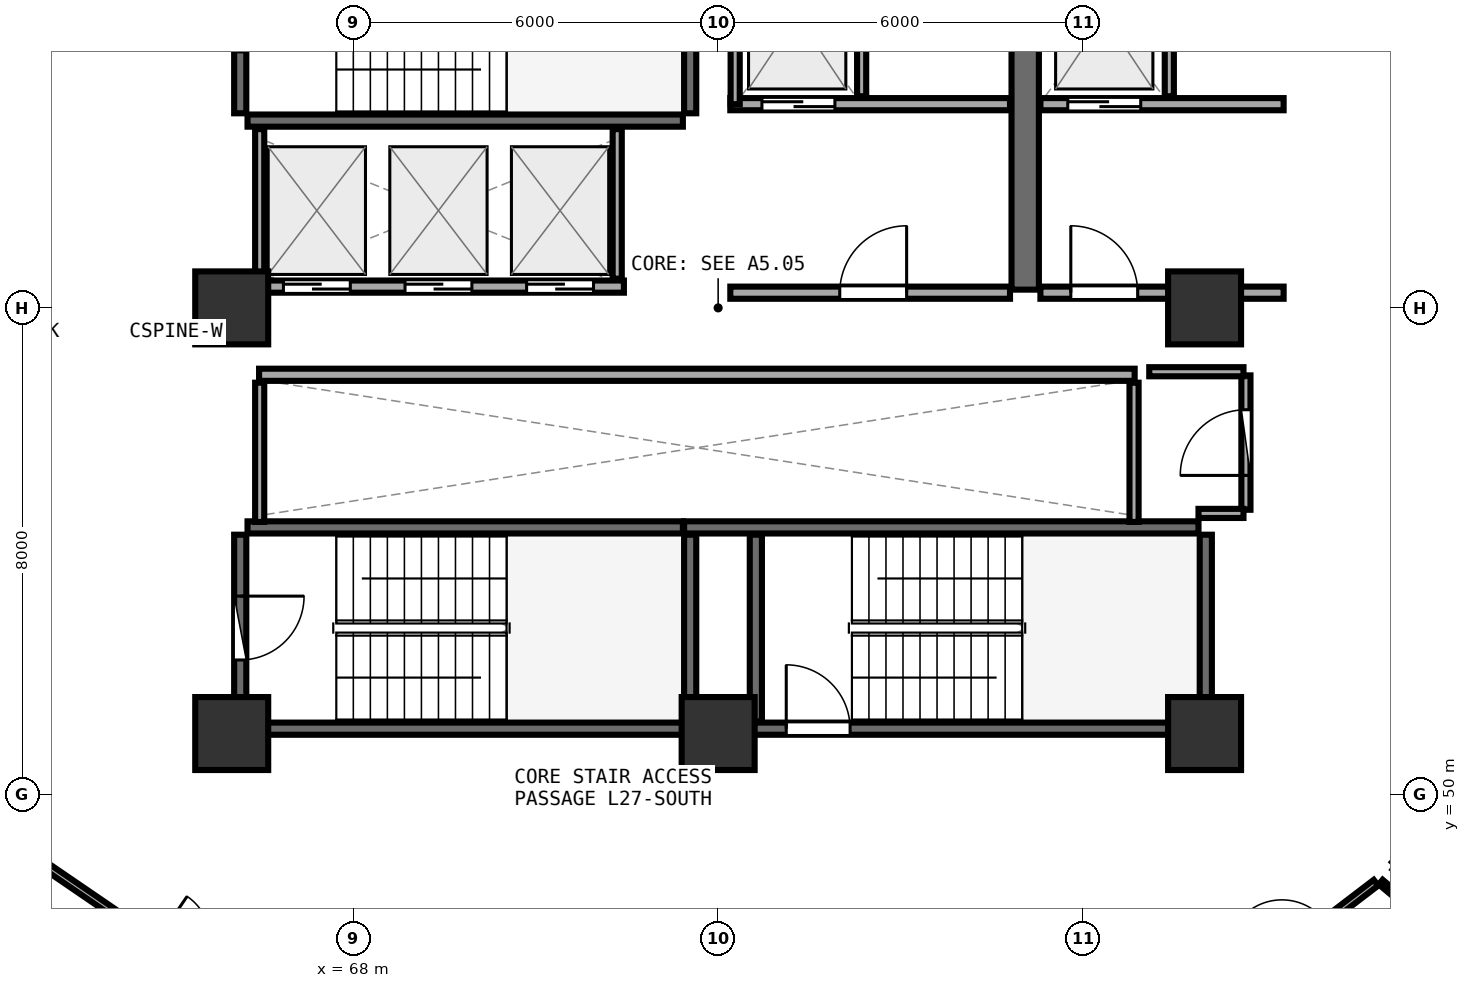
"""IFC4 building model, lengths in metres.
Left out: names, types, materials, properties, quantities, classifications, styles, units other than length and angle.
Written with IfcOpenShell. Run it as: python <this file> out.ifc"""

import sys

from ifc_helpers import new_model, si_unit, direction, frame, frame_2d, origin, origin_2d, place, context, subcontext, project, spatial, rectangle, extrude, element, fill, save


model = new_model("IFC4")
c1 = context("Model", 3, precision=1e-05, world=origin(), true_north=direction((0.0, 1.0)))
c2 = subcontext(c1, "Body", "Model", "MODEL_VIEW")
j1 = project(units=[si_unit("LENGTHUNIT", "METRE"), si_unit("PLANEANGLEUNIT", "RADIAN")], contexts=[c1])
p1 = place(None, origin())
s1 = spatial("IfcSite", under=j1, at=p1, CompositionType="ELEMENT")
p2 = place(p1, origin())
s2 = spatial("IfcBuilding", under=s1, at=p2, CompositionType="ELEMENT")
p3 = place(p2, frame((0.0, 0.0, 106.35)))
s3 = spatial("IfcBuildingStorey", under=s2, at=p3, CompositionType="ELEMENT", Elevation=106.35)
for number, where, z_axis, x_axis in (
    (1, (66.0, 51.0, 0.0), (0.0, 0.0, 1.0), (1.0, 0.0, 0.0)),
    (2, (74.0, 51.0, 0.0), (0.0, 0.0, 1.0), (1.0, 0.0, 0.0)),
    (3, (82.0, 51.0, 0.0), (0.0, 0.0, 1.0), (1.0, 0.0, 0.0)),
    (4, (82.0, 58.0, 0.0), (0.0, 0.0, 1.0), (1.0, 0.0, 0.0)),
    (5, (66.0, 58.0, 0.0), (0.0, 0.0, 1.0), (1.0, 0.0, 0.0)),
):
    element("IfcColumn", number, at=place(p3, frame(where, z_axis=z_axis, x_axis=x_axis)), inside=s3, PredefinedType="PILASTER", context=c2, shape_type="SweptSolid", body=[
        extrude(rectangle(XDim=1.2, YDim=1.2, at=origin_2d()), origin(), (0.0, 0.0, 1.0), 3.75),
    ])
p4 = place(p3, frame((66.26, 61.08, 0.0), z_axis=(0.0, 0.0, 1.0), x_axis=(1.0, 0.0, 0.0)))
e6 = element("IfcWall", 6, at=p4, inside=s3, PredefinedType="SHEAR", context=c2, shape_type="SweptSolid", body=[
    extrude(rectangle(XDim=7.16, YDim=0.2, at=frame_2d((3.58, 0.0))), origin(), (0.0, 0.0, 1.0), 3.49),
])
p5 = place(p3, frame((73.54, 61.2, 0.0), z_axis=(0.0, 0.0, 1.0), x_axis=(0.0, 1.0, 0.0)))
e7 = element("IfcWall", 7, at=p5, inside=s3, PredefinedType="SHEAR", context=c2, shape_type="SweptSolid", body=[
    extrude(rectangle(XDim=3.07, YDim=0.2, at=frame_2d((1.535, 0.0))), origin(), (0.0, 0.0, 1.0), 3.49),
])
p6 = place(p3, frame((66.14, 64.27, 0.0), z_axis=(0.0, 0.0, 1.0), x_axis=(0.0, -1.0, 0.0)))
e8 = element("IfcWall", 8, at=p6, inside=s3, PredefinedType="SHEAR", context=c2, shape_type="SweptSolid", body=[
    extrude(rectangle(XDim=3.07, YDim=0.2, at=frame_2d((1.535, 0.0))), origin(), (0.0, 0.0, 1.0), 3.49),
])
p7 = place(p6, frame((1.01, 0.0, 0.0)))
e9 = element("IfcOpeningElement", 9, at=p7, cuts=e8, PredefinedType="OPENING", context=c2, shape_type="SweptSolid", body=[
    extrude(rectangle(XDim=1.05, YDim=2.1, at=frame_2d((0.525, 1.05))), frame((0.0, 0.11, 0.0), z_axis=(0.0, -1.0, 0.0), x_axis=(1.0, 0.0, 0.0)), (0.0, 0.0, 1.0), 0.22),
])
p8 = place(p3, frame((74.0, 51.08, 0.0), z_axis=(0.0, 0.0, 1.0), x_axis=(1.0, 0.0, 0.0)))
e10 = element("IfcWall", 10, at=p8, inside=s3, PredefinedType="SHEAR", context=c2, shape_type="SweptSolid", body=[
    extrude(rectangle(XDim=7.9, YDim=0.2, at=frame_2d((3.95, 0.0))), origin(), (0.0, 0.0, 1.0), 3.49),
])
p9 = place(p8, frame((1.12, 0.0, 0.0)))
e11 = element("IfcOpeningElement", 11, at=p9, cuts=e10, PredefinedType="OPENING", context=c2, shape_type="SweptSolid", body=[
    extrude(rectangle(XDim=1.05, YDim=2.1, at=frame_2d((0.525, 1.05))), frame((0.0, 0.11, 0.0), z_axis=(0.0, -1.0, 0.0), x_axis=(1.0, 0.0, 0.0)), (0.0, 0.0, 1.0), 0.22),
])
p10 = place(p3, frame((82.02, 51.2, 0.0), z_axis=(0.0, 0.0, 1.0), x_axis=(0.0, 1.0, 0.0)))
e12 = element("IfcWall", 12, at=p10, inside=s3, PredefinedType="SHEAR", context=c2, shape_type="SweptSolid", body=[
    extrude(rectangle(XDim=3.07, YDim=0.2, at=frame_2d((1.535, 0.0))), origin(), (0.0, 0.0, 1.0), 3.49),
])
p11 = place(p3, frame((81.9, 54.39, 0.0), z_axis=(0.0, 0.0, 1.0), x_axis=(-1.0, 0.0, 0.0)))
e13 = element("IfcWall", 13, at=p11, inside=s3, PredefinedType="SHEAR", context=c2, shape_type="SweptSolid", body=[
    extrude(rectangle(XDim=8.46, YDim=0.2, at=frame_2d((4.23, 0.0))), origin(), (0.0, 0.0, 1.0), 3.49),
])
p12 = place(p3, frame((74.62, 54.27, 0.0), z_axis=(0.0, 0.0, 1.0), x_axis=(0.0, -1.0, 0.0)))
e14 = element("IfcWall", 14, at=p12, inside=s3, PredefinedType="SHEAR", context=c2, shape_type="SweptSolid", body=[
    extrude(rectangle(XDim=3.07, YDim=0.2, at=frame_2d((1.535, 0.0))), origin(), (0.0, 0.0, 1.0), 3.49),
])
p13 = place(p3, frame((66.26, 51.08, 0.0), z_axis=(0.0, 0.0, 1.0), x_axis=(1.0, 0.0, 0.0)))
e15 = element("IfcWall", 15, at=p13, inside=s3, PredefinedType="SHEAR", context=c2, shape_type="SweptSolid", body=[
    extrude(rectangle(XDim=7.16, YDim=0.2, at=frame_2d((3.58, 0.0))), origin(), (0.0, 0.0, 1.0), 3.49),
])
p14 = place(p3, frame((73.54, 51.2, 0.0), z_axis=(0.0, 0.0, 1.0), x_axis=(0.0, 1.0, 0.0)))
e16 = element("IfcWall", 16, at=p14, inside=s3, PredefinedType="SHEAR", context=c2, shape_type="SweptSolid", body=[
    extrude(rectangle(XDim=3.07, YDim=0.2, at=frame_2d((1.535, 0.0))), origin(), (0.0, 0.0, 1.0), 3.49),
])
p15 = place(p3, frame((73.42, 54.39, 0.0), z_axis=(0.0, 0.0, 1.0), x_axis=(-1.0, 0.0, 0.0)))
e17 = element("IfcWall", 17, at=p15, inside=s3, PredefinedType="SHEAR", context=c2, shape_type="SweptSolid", body=[
    extrude(rectangle(XDim=7.16, YDim=0.2, at=frame_2d((3.58, 0.0))), origin(), (0.0, 0.0, 1.0), 3.49),
])
p16 = place(p3, frame((66.14, 54.27, 0.0), z_axis=(0.0, 0.0, 1.0), x_axis=(0.0, -1.0, 0.0)))
e18 = element("IfcWall", 18, at=p16, inside=s3, PredefinedType="SHEAR", context=c2, shape_type="SweptSolid", body=[
    extrude(rectangle(XDim=3.07, YDim=0.2, at=frame_2d((1.535, 0.0))), origin(), (0.0, 0.0, 1.0), 3.49),
])
p17 = place(p16, frame((1.01, 0.0, 0.0)))
e19 = element("IfcOpeningElement", 19, at=p17, cuts=e18, PredefinedType="OPENING", context=c2, shape_type="SweptSolid", body=[
    extrude(rectangle(XDim=1.05, YDim=2.1, at=frame_2d((0.525, 1.05))), frame((0.0, 0.11, 0.0), z_axis=(0.0, -1.0, 0.0), x_axis=(1.0, 0.0, 0.0)), (0.0, 0.0, 1.0), 0.22),
])
p18 = place(p3, frame((79.05, 58.3, 0.0), z_axis=(0.0, 0.0, 1.0), x_axis=(0.0, 1.0, 0.0)))
e20 = element("IfcWall", 20, at=p18, inside=s3, PredefinedType="SHEAR", context=c2, shape_type="SweptSolid", body=[
    extrude(rectangle(XDim=6.3, YDim=0.45, at=frame_2d((3.15, 0.0))), origin(), (0.0, 0.0, 1.0), 3.49),
])
p19 = place(p3, frame((74.2, 61.35, 0.0), z_axis=(0.0, 0.0, 1.0), x_axis=(1.0, 0.0, 0.0)))
e21 = element("IfcWall", 21, at=p19, inside=s3, PredefinedType="SOLIDWALL", context=c2, shape_type="SweptSolid", body=[
    extrude(rectangle(XDim=4.6, YDim=0.2, at=frame_2d((2.3, 0.0))), origin(), (0.0, 0.0, 1.0), 3.48),
])
p20 = place(p19, frame((0.52, 0.0, 0.0)))
e22 = element("IfcOpeningElement", 22, at=p20, cuts=e21, PredefinedType="OPENING", context=c2, shape_type="SweptSolid", body=[
    extrude(rectangle(XDim=1.2, YDim=2.15, at=frame_2d((0.6, 1.075))), frame((0.0, 0.11, 0.0), z_axis=(0.0, -1.0, 0.0), x_axis=(1.0, 0.0, 0.0)), (0.0, 0.0, 1.0), 0.22),
])
p21 = place(p3, frame((74.28, 61.35, 0.0), z_axis=(0.0, 0.0, 1.0), x_axis=(0.0, 1.0, 0.0)))
e23 = element("IfcWall", 23, at=p21, inside=s3, PredefinedType="PARTITIONING", context=c2, shape_type="SweptSolid", body=[
    extrude(rectangle(XDim=2.97, YDim=0.15, at=frame_2d((1.485, 0.0))), origin(), (0.0, 0.0, 1.0), 3.48),
])
p22 = place(p3, frame((76.36, 61.48, 0.0), z_axis=(0.0, 0.0, 1.0), x_axis=(0.0, 1.0, 0.0)))
e24 = element("IfcWall", 24, at=p22, inside=s3, PredefinedType="PARTITIONING", context=c2, shape_type="SweptSolid", body=[
    extrude(rectangle(XDim=2.84, YDim=0.15, at=frame_2d((1.42, 0.0))), origin(), (0.0, 0.0, 1.0), 3.48),
])
p23 = place(p3, frame((79.3, 61.35, 0.0), z_axis=(0.0, 0.0, 1.0), x_axis=(1.0, 0.0, 0.0)))
e25 = element("IfcWall", 25, at=p23, inside=s3, PredefinedType="SOLIDWALL", context=c2, shape_type="SweptSolid", body=[
    extrude(rectangle(XDim=4.0, YDim=0.2, at=frame_2d((2.0, 0.0))), origin(), (0.0, 0.0, 1.0), 2.775),
])
p24 = place(p23, frame((0.45, 0.0, 0.0)))
e26 = element("IfcOpeningElement", 26, at=p24, cuts=e25, PredefinedType="OPENING", context=c2, shape_type="SweptSolid", body=[
    extrude(rectangle(XDim=1.2, YDim=2.15, at=frame_2d((0.6, 1.075))), frame((0.0, 0.11, 0.0), z_axis=(0.0, -1.0, 0.0), x_axis=(1.0, 0.0, 0.0)), (0.0, 0.0, 1.0), 0.22),
])
p25 = place(p3, frame((81.42, 61.48, 0.0), z_axis=(0.0, 0.0, 1.0), x_axis=(0.0, 1.0, 0.0)))
e27 = element("IfcWall", 27, at=p25, inside=s3, PredefinedType="PARTITIONING", context=c2, shape_type="SweptSolid", body=[
    extrude(rectangle(XDim=2.84, YDim=0.15, at=frame_2d((1.42, 0.0))), origin(), (0.0, 0.0, 1.0), 3.48),
])
p26 = place(p3, frame((74.2, 58.25, 0.0), z_axis=(0.0, 0.0, 1.0), x_axis=(1.0, 0.0, 0.0)))
e28 = element("IfcWall", 28, at=p26, inside=s3, PredefinedType="SOLIDWALL", context=c2, shape_type="SweptSolid", body=[
    extrude(rectangle(XDim=4.6, YDim=0.2, at=frame_2d((2.3, 0.0))), origin(), (0.0, 0.0, 1.0), 3.48),
])
p27 = place(p26, frame((1.8, 0.0, 0.0)))
e29 = element("IfcOpeningElement", 29, at=p27, cuts=e28, PredefinedType="OPENING", context=c2, shape_type="SweptSolid", body=[
    extrude(rectangle(XDim=1.1, YDim=2.1, at=frame_2d((0.55, 1.05))), frame((0.0, 0.11, 0.0), z_axis=(0.0, -1.0, 0.0), x_axis=(1.0, 0.0, 0.0)), (0.0, 0.0, 1.0), 0.22),
])
p28 = place(p3, frame((79.3, 58.25, 0.0), z_axis=(0.0, 0.0, 1.0), x_axis=(1.0, 0.0, 0.0)))
e30 = element("IfcWall", 30, at=p28, inside=s3, PredefinedType="SOLIDWALL", context=c2, shape_type="SweptSolid", body=[
    extrude(rectangle(XDim=4.0, YDim=0.2, at=frame_2d((2.0, 0.0))), origin(), (0.0, 0.0, 1.0), 2.775),
])
p29 = place(p28, frame((0.5, 0.0, 0.0)))
e31 = element("IfcOpeningElement", 31, at=p29, cuts=e30, PredefinedType="OPENING", context=c2, shape_type="SweptSolid", body=[
    extrude(rectangle(XDim=1.1, YDim=2.1, at=frame_2d((0.55, 1.05))), frame((0.0, 0.11, 0.0), z_axis=(0.0, -1.0, 0.0), x_axis=(1.0, 0.0, 0.0)), (0.0, 0.0, 1.0), 0.22),
])
p30 = place(p3, frame((66.45, 58.35, 0.0), z_axis=(0.0, 0.0, 1.0), x_axis=(1.0, 0.0, 0.0)))
e32 = element("IfcWall", 32, at=p30, inside=s3, PredefinedType="SOLIDWALL", context=c2, shape_type="SweptSolid", body=[
    extrude(rectangle(XDim=6.0, YDim=0.2, at=frame_2d((3.0, 0.0))), origin(), (0.0, 0.0, 1.0), 3.48),
])
p31 = place(p30, frame((0.4, 0.0, 0.0)))
e33 = element("IfcOpeningElement", 33, at=p31, cuts=e32, PredefinedType="OPENING", context=c2, shape_type="SweptSolid", body=[
    extrude(rectangle(XDim=1.1, YDim=2.1, at=frame_2d((0.55, 1.05))), frame((0.0, 0.11, 0.0), z_axis=(0.0, -1.0, 0.0), x_axis=(1.0, 0.0, 0.0)), (0.0, 0.0, 1.0), 0.22),
])
p32 = place(p30, frame((2.4, 0.0, 0.0)))
e34 = element("IfcOpeningElement", 34, at=p32, cuts=e32, PredefinedType="OPENING", context=c2, shape_type="SweptSolid", body=[
    extrude(rectangle(XDim=1.1, YDim=2.1, at=frame_2d((0.55, 1.05))), frame((0.0, 0.11, 0.0), z_axis=(0.0, -1.0, 0.0), x_axis=(1.0, 0.0, 0.0)), (0.0, 0.0, 1.0), 0.22),
])
p33 = place(p30, frame((4.4, 0.0, 0.0)))
e35 = element("IfcOpeningElement", 35, at=p33, cuts=e32, PredefinedType="OPENING", context=c2, shape_type="SweptSolid", body=[
    extrude(rectangle(XDim=1.1, YDim=2.1, at=frame_2d((0.55, 1.05))), frame((0.0, 0.11, 0.0), z_axis=(0.0, -1.0, 0.0), x_axis=(1.0, 0.0, 0.0)), (0.0, 0.0, 1.0), 0.22),
])
for number, where, z_axis, x_axis in (
    (36, (66.46, 58.48, 0.0), (0.0, 0.0, 1.0), (0.0, 1.0, 0.0)),
    (37, (72.34, 58.48, 0.0), (0.0, 0.0, 1.0), (0.0, 1.0, 0.0)),
):
    element("IfcWall", number, at=place(p3, frame(where, z_axis=z_axis, x_axis=x_axis)), inside=s3, PredefinedType="PARTITIONING", context=c2, shape_type="SweptSolid", body=[
        extrude(rectangle(XDim=2.46, YDim=0.15, at=frame_2d((1.23, 0.0))), origin(), (0.0, 0.0, 1.0), 3.48),
    ])
p34 = place(p3, frame((66.45, 56.9, 0.0), z_axis=(0.0, 0.0, 1.0), x_axis=(1.0, 0.0, 0.0)))
e38 = element("IfcWall", 38, at=p34, inside=s3, PredefinedType="SOLIDWALL", context=c2, shape_type="SweptSolid", body=[
    extrude(rectangle(XDim=14.4, YDim=0.2, at=frame_2d((7.2, 0.0))), origin(), (0.0, 0.0, 1.0), 3.48),
])
for number, where, z_axis, x_axis in (
    (39, (66.46, 54.48, 0.0), (0.0, 0.0, 1.0), (0.0, 1.0, 0.0)),
    (40, (80.84, 54.48, 0.0), (0.0, 0.0, 1.0), (0.0, 1.0, 0.0)),
):
    element("IfcWall", number, at=place(p3, frame(where, z_axis=z_axis, x_axis=x_axis)), inside=s3, PredefinedType="PARTITIONING", context=c2, shape_type="SweptSolid", body=[
        extrude(rectangle(XDim=2.29, YDim=0.15, at=frame_2d((1.145, 0.0))), origin(), (0.0, 0.0, 1.0), 3.48),
    ])
p35 = place(p3, frame((82.68, 54.68, 0.0), z_axis=(0.0, 0.0, 1.0), x_axis=(0.0, 1.0, 0.0)))
e41 = element("IfcWall", 41, at=p35, inside=s3, PredefinedType="PARTITIONING", context=c2, shape_type="SweptSolid", body=[
    extrude(rectangle(XDim=2.21, YDim=0.15, at=frame_2d((1.105, 0.0))), origin(), (0.0, 0.0, 1.0), 3.48),
])
p36 = place(p35, frame((0.565, 0.0, 0.0)))
e42 = element("IfcOpeningElement", 42, at=p36, cuts=e41, PredefinedType="OPENING", context=c2, shape_type="SweptSolid", body=[
    extrude(rectangle(XDim=1.08, YDim=2.1, at=frame_2d((0.54, 1.05))), frame((0.0, 0.085, 0.0), z_axis=(0.0, -1.0, 0.0), x_axis=(1.0, 0.0, 0.0)), (0.0, 0.0, 1.0), 0.17),
])
p37 = place(p3, frame((62.827, 48.899, 0.0), z_axis=(0.0, 0.0, 1.0), x_axis=(0.825618475233, -0.564228795219, 0.0)))
e43 = element("IfcWall", 43, at=p37, inside=s3, PredefinedType="PARTITIONING", context=c2, shape_type="SweptSolid", body=[
    extrude(rectangle(XDim=5.578, YDim=0.12, at=frame_2d((2.789, 0.0))), origin(), (0.0, 0.0, 1.0), 2.925),
])
p38 = place(p37, frame((2.339, 0.0, 0.0)))
e44 = element("IfcOpeningElement", 44, at=p38, cuts=e43, PredefinedType="OPENING", context=c2, shape_type="SweptSolid", body=[
    extrude(rectangle(XDim=0.9, YDim=2.08, at=frame_2d((0.45, 1.04))), frame((0.0, 0.07, 0.0), z_axis=(0.0, -1.0, 0.0), x_axis=(1.0, 0.0, 0.0)), (0.0, 0.0, 1.0), 0.14),
])
p39 = place(p3, frame((82.44, 46.729, 0.0), z_axis=(0.0, 0.0, 1.0), x_axis=(0.794654066843, 0.607062528945, 0.0)))
e45 = element("IfcWall", 45, at=p39, inside=s3, PredefinedType="PARTITIONING", context=c2, shape_type="SweptSolid", body=[
    extrude(rectangle(XDim=2.993, YDim=0.12, at=frame_2d((1.497, 0.0))), origin(), (0.0, 0.0, 1.0), 2.925),
])
p40 = place(p39, frame((1.047, 0.0, 0.0)))
e46 = element("IfcOpeningElement", 46, at=p40, cuts=e45, PredefinedType="OPENING", context=c2, shape_type="SweptSolid", body=[
    extrude(rectangle(XDim=0.9, YDim=2.08, at=frame_2d((0.45, 1.04))), frame((0.0, 0.07, 0.0), z_axis=(0.0, -1.0, 0.0), x_axis=(1.0, 0.0, 0.0)), (0.0, 0.0, 1.0), 0.14),
])
p41 = place(p3, frame((81.9, 54.62, 0.0), z_axis=(0.0, 0.0, 1.0), x_axis=(1.0, 0.0, 0.0)))
e47 = element("IfcWall", 47, at=p41, inside=s3, PredefinedType="PARTITIONING", context=c2, shape_type="SweptSolid", body=[
    extrude(rectangle(XDim=0.74, YDim=0.15, at=frame_2d((0.37, 0.0))), origin(), (0.0, 0.0, 1.0), 2.775),
])
p42 = place(p3, frame((82.64, 56.95, 0.0), z_axis=(0.0, 0.0, 1.0), x_axis=(-1.0, 0.0, 0.0)))
e48 = element("IfcWall", 48, at=p42, inside=s3, PredefinedType="PARTITIONING", context=c2, shape_type="SweptSolid", body=[
    extrude(rectangle(XDim=1.55, YDim=0.15, at=frame_2d((0.775, 0.0))), origin(), (0.0, 0.0, 1.0), 2.775),
])
p43 = place(p3, frame((84.896, 48.557, 0.0), z_axis=(0.0, 0.0, 1.0), x_axis=(0.765171343651, -0.64382669629, 0.0)))
e49 = element("IfcWall", 49, at=p43, inside=s3, PredefinedType="PARTITIONING", context=c2, shape_type="SweptSolid", body=[
    extrude(rectangle(XDim=9.416, YDim=0.1, at=frame_2d((4.708, 0.0))), origin(), (0.0, 0.0, 1.0), 2.975),
])
p44 = place(p9, origin())
e50 = element("IfcDoor", 50, at=p44, inside=s3, OperationType="SINGLE_SWING_LEFT", PredefinedType="DOOR", context=c2, shape_type="SweptSolid", body=[
    extrude(rectangle(XDim=1.05, YDim=2.1, at=frame_2d((0.525, 1.05))), frame((0.0, 0.025, 0.0), z_axis=(0.0, -1.0, 0.0), x_axis=(1.0, 0.0, 0.0)), (0.0, 0.0, 1.0), 0.05),
])
fill(e11, e50)
p45 = place(p17, origin())
e51 = element("IfcDoor", 51, at=p45, inside=s3, OperationType="SINGLE_SWING_LEFT", PredefinedType="DOOR", context=c2, shape_type="SweptSolid", body=[
    extrude(rectangle(XDim=1.05, YDim=2.1, at=frame_2d((0.525, 1.05))), frame((0.0, 0.025, 0.0), z_axis=(0.0, -1.0, 0.0), x_axis=(1.0, 0.0, 0.0)), (0.0, 0.0, 1.0), 0.05),
])
fill(e19, e51)
p46 = place(p20, origin())
e52 = element("IfcDoor", 52, at=p46, inside=s3, OperationType="DOUBLE_DOOR_SLIDING", PredefinedType="DOOR", context=c2, shape_type="SweptSolid", body=[
    extrude(rectangle(XDim=1.2, YDim=2.15, at=frame_2d((0.6, 1.075))), frame((0.0, 0.025, 0.0), z_axis=(0.0, -1.0, 0.0), x_axis=(1.0, 0.0, 0.0)), (0.0, 0.0, 1.0), 0.05),
])
fill(e22, e52)
p47 = place(p24, origin())
e53 = element("IfcDoor", 53, at=p47, inside=s3, OperationType="DOUBLE_DOOR_SLIDING", PredefinedType="DOOR", context=c2, shape_type="SweptSolid", body=[
    extrude(rectangle(XDim=1.2, YDim=2.15, at=frame_2d((0.6, 1.075))), frame((0.0, 0.025, 0.0), z_axis=(0.0, -1.0, 0.0), x_axis=(1.0, 0.0, 0.0)), (0.0, 0.0, 1.0), 0.05),
])
fill(e26, e53)
p48 = place(p27, frame((1.1, 0.0, 0.0), z_axis=(0.0, 0.0, 1.0), x_axis=(-1.0, 0.0, 0.0)))
e54 = element("IfcDoor", 54, at=p48, inside=s3, OperationType="SINGLE_SWING_LEFT", PredefinedType="DOOR", context=c2, shape_type="SweptSolid", body=[
    extrude(rectangle(XDim=1.1, YDim=2.1, at=frame_2d((0.55, 1.05))), frame((0.0, 0.025, 0.0), z_axis=(0.0, -1.0, 0.0), x_axis=(1.0, 0.0, 0.0)), (0.0, 0.0, 1.0), 0.05),
])
fill(e29, e54)
p49 = place(p29, frame((1.1, 0.0, 0.0), z_axis=(0.0, 0.0, 1.0), x_axis=(-1.0, 0.0, 0.0)))
e55 = element("IfcDoor", 55, at=p49, inside=s3, OperationType="SINGLE_SWING_RIGHT", PredefinedType="DOOR", context=c2, shape_type="SweptSolid", body=[
    extrude(rectangle(XDim=1.1, YDim=2.1, at=frame_2d((0.55, 1.05))), frame((0.0, 0.025, 0.0), z_axis=(0.0, -1.0, 0.0), x_axis=(1.0, 0.0, 0.0)), (0.0, 0.0, 1.0), 0.05),
])
fill(e31, e55)
p50 = place(p31, origin())
e56 = element("IfcDoor", 56, at=p50, inside=s3, OperationType="DOUBLE_DOOR_SLIDING", PredefinedType="DOOR", context=c2, shape_type="SweptSolid", body=[
    extrude(rectangle(XDim=1.1, YDim=2.1, at=frame_2d((0.55, 1.05))), frame((0.0, 0.025, 0.0), z_axis=(0.0, -1.0, 0.0), x_axis=(1.0, 0.0, 0.0)), (0.0, 0.0, 1.0), 0.05),
])
fill(e33, e56)
p51 = place(p32, origin())
e57 = element("IfcDoor", 57, at=p51, inside=s3, OperationType="DOUBLE_DOOR_SLIDING", PredefinedType="DOOR", context=c2, shape_type="SweptSolid", body=[
    extrude(rectangle(XDim=1.1, YDim=2.1, at=frame_2d((0.55, 1.05))), frame((0.0, 0.025, 0.0), z_axis=(0.0, -1.0, 0.0), x_axis=(1.0, 0.0, 0.0)), (0.0, 0.0, 1.0), 0.05),
])
fill(e34, e57)
p52 = place(p33, origin())
e58 = element("IfcDoor", 58, at=p52, inside=s3, OperationType="DOUBLE_DOOR_SLIDING", PredefinedType="DOOR", context=c2, shape_type="SweptSolid", body=[
    extrude(rectangle(XDim=1.1, YDim=2.1, at=frame_2d((0.55, 1.05))), frame((0.0, 0.025, 0.0), z_axis=(0.0, -1.0, 0.0), x_axis=(1.0, 0.0, 0.0)), (0.0, 0.0, 1.0), 0.05),
])
fill(e35, e58)
p53 = place(p36, origin())
e59 = element("IfcDoor", 59, at=p53, inside=s3, OperationType="SINGLE_SWING_LEFT", PredefinedType="DOOR", context=c2, shape_type="SweptSolid", body=[
    extrude(rectangle(XDim=1.08, YDim=2.1, at=frame_2d((0.54, 1.05))), frame((0.0, 0.025, 0.0), z_axis=(0.0, -1.0, 0.0), x_axis=(1.0, 0.0, 0.0)), (0.0, 0.0, 1.0), 0.05),
])
fill(e42, e59)
save(model, sys.argv[1])
